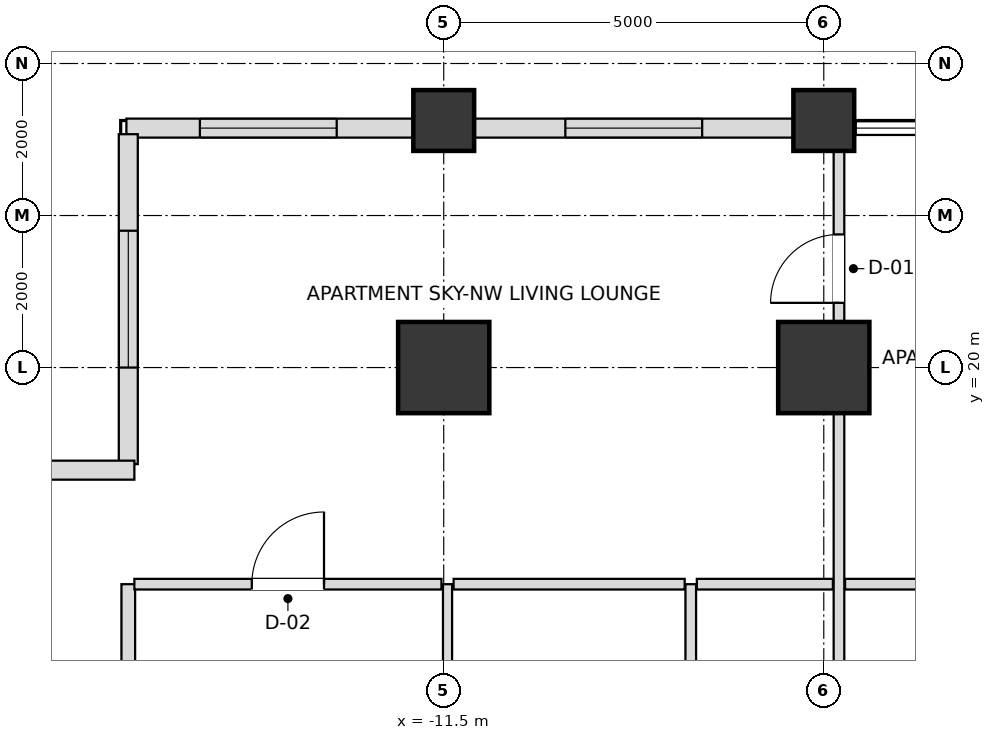
"""IFC4 building model, lengths in metres.
Left out: names, types, materials, properties, quantities, classifications, styles, units other than length and angle.
Written with IfcOpenShell. Run it as: python <this file> out.ifc"""

import sys

from ifc_helpers import new_model, si_unit, direction, frame, frame_2d, origin, origin_2d, place, context, subcontext, project, spatial, rectangle, extrude, element, fill, save


model = new_model("IFC4")
c1 = context("Model", 3, precision=1e-05, world=origin(), true_north=direction((0.0, 1.0)))
c2 = subcontext(c1, "Body", "Model", "MODEL_VIEW")
j1 = project(units=[si_unit("LENGTHUNIT", "METRE"), si_unit("PLANEANGLEUNIT", "RADIAN")], contexts=[c1])
p1 = place(None, origin())
s1 = spatial("IfcSite", under=j1, at=p1, CompositionType="ELEMENT")
p2 = place(p1, origin())
s2 = spatial("IfcBuilding", under=s1, at=p2, CompositionType="ELEMENT")
p3 = place(p2, frame((0.0, 0.0, 129.6)))
s3 = spatial("IfcBuildingStorey", under=s2, at=p3, CompositionType="ELEMENT", Elevation=129.6)
for number, where, z_axis, x_axis in (
    (1, (-6.5, 20.0, 0.0), (0.0, 0.0, 1.0), (1.0, 0.0, 0.0)),
    (2, (-11.5, 20.0, 0.0), (0.0, 0.0, 1.0), (1.0, 0.0, 0.0)),
):
    element("IfcColumn", number, at=place(p3, frame(where, z_axis=z_axis, x_axis=x_axis)), inside=s3, PredefinedType="USERDEFINED", context=c2, shape_type="SweptSolid", body=[
        extrude(rectangle(XDim=1.2, YDim=1.2, at=origin_2d()), origin(), (0.0, 0.0, 1.0), 3.6),
    ])
for number, where, z_axis, x_axis in (
    (3, (-11.5, 23.25, 0.0), (0.0, 0.0, 1.0), (1.0, 0.0, 0.0)),
    (4, (-6.5, 23.25, 0.0), (0.0, 0.0, 1.0), (1.0, 0.0, 0.0)),
):
    element("IfcColumn", number, at=place(p3, frame(where, z_axis=z_axis, x_axis=x_axis)), inside=s3, PredefinedType="COLUMN", context=c2, shape_type="SweptSolid", body=[
        extrude(rectangle(XDim=0.8, YDim=0.8, at=origin_2d()), origin(), (0.0, 0.0, 1.0), 3.6),
    ])
p4 = place(p3, frame((-6.895, 23.15, 0.0), z_axis=(0.0, 0.0, 1.0), x_axis=(-1.0, 0.0, 0.0)))
e5 = element("IfcWall", 5, at=p4, inside=s3, PredefinedType="SOLIDWALL", context=c2, shape_type="SweptSolid", body=[
    extrude(rectangle(XDim=4.21, YDim=0.25, at=frame_2d((2.105, 0.0))), origin(), (0.0, 0.0, 1.0), 2.736),
])
p5 = place(p4, frame((1.205, 0.0, 0.72)))
e6 = element("IfcOpeningElement", 6, at=p5, cuts=e5, PredefinedType="OPENING", context=c2, shape_type="SweptSolid", body=[
    extrude(rectangle(XDim=1.8, YDim=1.68, at=frame_2d((0.9, 0.84))), frame((0.0, 0.135, 0.0), z_axis=(0.0, -1.0, 0.0), x_axis=(1.0, 0.0, 0.0)), (0.0, 0.0, 1.0), 0.27),
])
p6 = place(p3, frame((-11.895, 23.15, 0.0), z_axis=(0.0, 0.0, 1.0), x_axis=(-1.0, 0.0, 0.0)))
e7 = element("IfcWall", 7, at=p6, inside=s3, PredefinedType="SOLIDWALL", context=c2, shape_type="SweptSolid", body=[
    extrude(rectangle(XDim=3.78, YDim=0.25, at=frame_2d((1.89, 0.0))), origin(), (0.0, 0.0, 1.0), 2.736),
])
p7 = place(p6, frame((1.013, 0.0, 0.72)))
e8 = element("IfcOpeningElement", 8, at=p7, cuts=e7, PredefinedType="OPENING", context=c2, shape_type="SweptSolid", body=[
    extrude(rectangle(XDim=1.8, YDim=1.68, at=frame_2d((0.9, 0.84))), frame((0.0, 0.135, 0.0), z_axis=(0.0, -1.0, 0.0), x_axis=(1.0, 0.0, 0.0)), (0.0, 0.0, 1.0), 0.27),
])
p8 = place(p3, frame((-15.65, 23.07, 0.0), z_axis=(0.0, 0.0, 1.0), x_axis=(0.0, -1.0, 0.0)))
e9 = element("IfcWall", 9, at=p8, inside=s3, PredefinedType="SOLIDWALL", context=c2, shape_type="SweptSolid", body=[
    extrude(rectangle(XDim=4.34, YDim=0.25, at=frame_2d((2.17, 0.0))), origin(), (0.0, 0.0, 1.0), 2.736),
])
p9 = place(p8, frame((1.27, 0.0, 0.72)))
e10 = element("IfcOpeningElement", 10, at=p9, cuts=e9, PredefinedType="OPENING", context=c2, shape_type="SweptSolid", body=[
    extrude(rectangle(XDim=1.8, YDim=1.68, at=frame_2d((0.9, 0.84))), frame((0.0, 0.135, 0.0), z_axis=(0.0, -1.0, 0.0), x_axis=(1.0, 0.0, 0.0)), (0.0, 0.0, 1.0), 0.27),
])
p10 = place(p3, frame((-15.57, 18.65, 0.0), z_axis=(0.0, 0.0, 1.0), x_axis=(-1.0, 0.0, 0.0)))
e11 = element("IfcWall", 11, at=p10, inside=s3, PredefinedType="SOLIDWALL", context=c2, shape_type="SweptSolid", body=[
    extrude(rectangle(XDim=4.66, YDim=0.25, at=frame_2d((2.33, 0.0))), origin(), (0.0, 0.0, 1.0), 2.736),
])
p11 = place(p10, frame((1.43, 0.0, 0.72)))
e12 = element("IfcOpeningElement", 12, at=p11, cuts=e11, PredefinedType="OPENING", context=c2, shape_type="SweptSolid", body=[
    extrude(rectangle(XDim=1.8, YDim=1.68, at=frame_2d((0.9, 0.84))), frame((0.0, 0.135, 0.0), z_axis=(0.0, -1.0, 0.0), x_axis=(1.0, 0.0, 0.0)), (0.0, 0.0, 1.0), 0.27),
])
p12 = place(p3, frame((-15.65, 9.8, 0.0), z_axis=(0.0, 0.0, 1.0), x_axis=(0.0, 1.0, 0.0)))
e13 = element("IfcWall", 13, at=p12, inside=s3, PredefinedType="PARTITIONING", context=c2, shape_type="SweptSolid", body=[
    extrude(rectangle(XDim=7.35, YDim=0.18, at=frame_2d((3.675, 0.0))), origin(), (0.0, 0.0, 1.0), 2.736),
])
p13 = place(p3, frame((-11.45, 9.8, 0.0), z_axis=(0.0, 0.0, 1.0), x_axis=(0.0, 1.0, 0.0)))
e14 = element("IfcWall", 14, at=p13, inside=s3, PredefinedType="PARTITIONING", context=c2, shape_type="SweptSolid", body=[
    extrude(rectangle(XDim=7.35, YDim=0.12, at=frame_2d((3.675, 0.0))), origin(), (0.0, 0.0, 1.0), 2.736),
])
p14 = place(p13, frame((3.713, 0.0, 0.0)))
e15 = element("IfcOpeningElement", 15, at=p14, cuts=e14, PredefinedType="OPENING", context=c2, shape_type="SweptSolid", body=[
    extrude(rectangle(XDim=0.95, YDim=2.1, at=frame_2d((0.475, 1.05))), frame((0.0, 0.07, 0.0), z_axis=(0.0, -1.0, 0.0), x_axis=(1.0, 0.0, 0.0)), (0.0, 0.0, 1.0), 0.14),
])
p15 = place(p3, frame((-8.25, 9.8, 0.0), z_axis=(0.0, 0.0, 1.0), x_axis=(0.0, 1.0, 0.0)))
e16 = element("IfcWall", 16, at=p15, inside=s3, PredefinedType="PARTITIONING", context=c2, shape_type="SweptSolid", body=[
    extrude(rectangle(XDim=7.35, YDim=0.14, at=frame_2d((3.675, 0.0))), origin(), (0.0, 0.0, 1.0), 2.816),
])
p16 = place(p15, frame((3.22, 0.0, 0.0)))
e17 = element("IfcOpeningElement", 17, at=p16, cuts=e16, PredefinedType="OPENING", context=c2, shape_type="SweptSolid", body=[
    extrude(rectangle(XDim=0.9, YDim=2.1, at=frame_2d((0.45, 1.05))), frame((0.0, 0.08, 0.0), z_axis=(0.0, -1.0, 0.0), x_axis=(1.0, 0.0, 0.0)), (0.0, 0.0, 1.0), 0.16),
])
p17 = place(p3, frame((-6.3, 9.8, 0.0), z_axis=(0.0, 0.0, 1.0), x_axis=(0.0, 1.0, 0.0)))
e18 = element("IfcWall", 18, at=p17, inside=s3, PredefinedType="PARTITIONING", context=c2, shape_type="SweptSolid", body=[
    extrude(rectangle(XDim=13.35, YDim=0.14, at=frame_2d((6.675, 0.0))), origin(), (0.0, 0.0, 1.0), 2.816),
])
p18 = place(p17, frame((11.051, 0.0, 0.0)))
e19 = element("IfcOpeningElement", 19, at=p18, cuts=e18, PredefinedType="OPENING", context=c2, shape_type="SweptSolid", body=[
    extrude(rectangle(XDim=0.9, YDim=2.1, at=frame_2d((0.45, 1.05))), frame((0.0, 0.08, 0.0), z_axis=(0.0, -1.0, 0.0), x_axis=(1.0, 0.0, 0.0)), (0.0, 0.0, 1.0), 0.16),
])
p19 = place(p3, frame((-15.57, 17.15, 0.0), z_axis=(0.0, 0.0, 1.0), x_axis=(1.0, 0.0, 0.0)))
e20 = element("IfcWall", 20, at=p19, inside=s3, PredefinedType="PARTITIONING", context=c2, shape_type="SweptSolid", body=[
    extrude(rectangle(XDim=4.04, YDim=0.14, at=frame_2d((2.02, 0.0))), origin(), (0.0, 0.0, 1.0), 2.736),
])
p20 = place(p19, frame((1.545, 0.0, 0.0)))
e21 = element("IfcOpeningElement", 21, at=p20, cuts=e20, PredefinedType="OPENING", context=c2, shape_type="SweptSolid", body=[
    extrude(rectangle(XDim=0.95, YDim=2.1, at=frame_2d((0.475, 1.05))), frame((0.0, 0.08, 0.0), z_axis=(0.0, -1.0, 0.0), x_axis=(1.0, 0.0, 0.0)), (0.0, 0.0, 1.0), 0.16),
])
p21 = place(p3, frame((-11.37, 17.15, 0.0), z_axis=(0.0, 0.0, 1.0), x_axis=(1.0, 0.0, 0.0)))
e22 = element("IfcWall", 22, at=p21, inside=s3, PredefinedType="PARTITIONING", context=c2, shape_type="SweptSolid", body=[
    extrude(rectangle(XDim=3.04, YDim=0.14, at=frame_2d((1.52, 0.0))), origin(), (0.0, 0.0, 1.0), 3.38),
])
p22 = place(p3, frame((-8.17, 17.15, 0.0), z_axis=(0.0, 0.0, 1.0), x_axis=(1.0, 0.0, 0.0)))
e23 = element("IfcWall", 23, at=p22, inside=s3, PredefinedType="PARTITIONING", context=c2, shape_type="SweptSolid", body=[
    extrude(rectangle(XDim=1.79, YDim=0.14, at=frame_2d((0.895, 0.0))), origin(), (0.0, 0.0, 1.0), 2.816),
])
p23 = place(p3, frame((-6.22, 17.15, 0.0), z_axis=(0.0, 0.0, 1.0), x_axis=(1.0, 0.0, 0.0)))
e24 = element("IfcWall", 24, at=p23, inside=s3, PredefinedType="PARTITIONING", context=c2, shape_type="SweptSolid", body=[
    extrude(rectangle(XDim=4.94, YDim=0.14, at=frame_2d((2.47, 0.0))), origin(), (0.0, 0.0, 1.0), 3.38),
])
p24 = place(p23, frame((1.995, 0.0, 0.0)))
e25 = element("IfcOpeningElement", 25, at=p24, cuts=e24, PredefinedType="OPENING", context=c2, shape_type="SweptSolid", body=[
    extrude(rectangle(XDim=0.95, YDim=2.1, at=frame_2d((0.475, 1.05))), frame((0.0, 0.08, 0.0), z_axis=(0.0, -1.0, 0.0), x_axis=(1.0, 0.0, 0.0)), (0.0, 0.0, 1.0), 0.16),
])
p25 = place(p5, origin())
e26 = element("IfcWindow", 26, at=p25, inside=s3, PartitioningType="SINGLE_PANEL", PredefinedType="WINDOW", context=c2, shape_type="SweptSolid", body=[
    extrude(rectangle(XDim=1.8, YDim=1.68, at=frame_2d((0.9, 0.84))), frame((0.0, 0.03, 0.0), z_axis=(0.0, -1.0, 0.0), x_axis=(1.0, 0.0, 0.0)), (0.0, 0.0, 1.0), 0.06),
])
fill(e6, e26)
p26 = place(p7, origin())
e27 = element("IfcWindow", 27, at=p26, inside=s3, PartitioningType="SINGLE_PANEL", PredefinedType="WINDOW", context=c2, shape_type="SweptSolid", body=[
    extrude(rectangle(XDim=1.8, YDim=1.68, at=frame_2d((0.9, 0.84))), frame((0.0, 0.03, 0.0), z_axis=(0.0, -1.0, 0.0), x_axis=(1.0, 0.0, 0.0)), (0.0, 0.0, 1.0), 0.06),
])
fill(e8, e27)
p27 = place(p9, origin())
e28 = element("IfcWindow", 28, at=p27, inside=s3, PartitioningType="SINGLE_PANEL", PredefinedType="WINDOW", context=c2, shape_type="SweptSolid", body=[
    extrude(rectangle(XDim=1.8, YDim=1.68, at=frame_2d((0.9, 0.84))), frame((0.0, 0.03, 0.0), z_axis=(0.0, -1.0, 0.0), x_axis=(1.0, 0.0, 0.0)), (0.0, 0.0, 1.0), 0.06),
])
fill(e10, e28)
p28 = place(p20, origin())
e29 = element("IfcDoor", 29, at=p28, inside=s3, OperationType="SINGLE_SWING_RIGHT", PredefinedType="DOOR", context=c2, shape_type="SweptSolid", body=[
    extrude(rectangle(XDim=0.95, YDim=2.1, at=frame_2d((0.475, 1.05))), frame((0.0, 0.025, 0.0), z_axis=(0.0, -1.0, 0.0), x_axis=(1.0, 0.0, 0.0)), (0.0, 0.0, 1.0), 0.05),
])
fill(e21, e29)
p29 = place(p18, origin())
e30 = element("IfcDoor", 30, at=p29, inside=s3, OperationType="SINGLE_SWING_LEFT", PredefinedType="DOOR", context=c2, shape_type="SweptSolid", body=[
    extrude(rectangle(XDim=0.9, YDim=2.1, at=frame_2d((0.45, 1.05))), frame((0.0, 0.025, 0.0), z_axis=(0.0, -1.0, 0.0), x_axis=(1.0, 0.0, 0.0)), (0.0, 0.0, 1.0), 0.05),
])
fill(e19, e30)
save(model, sys.argv[1])
